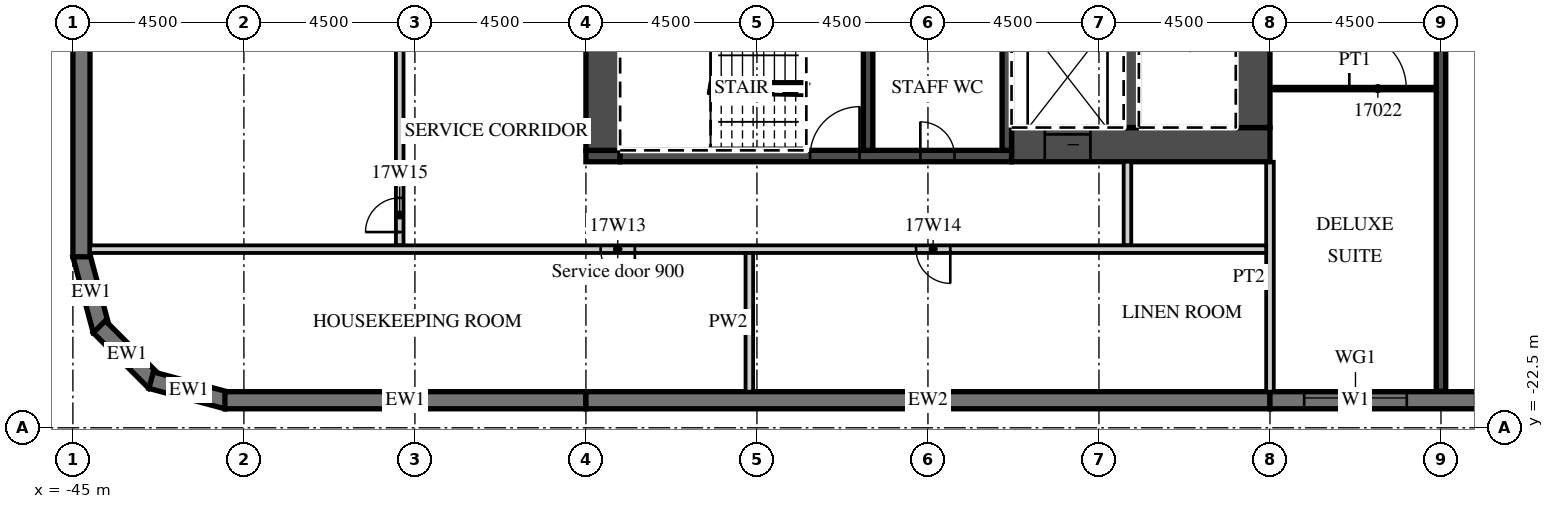
"""IFC4 building model, lengths in metres.
Left out: names, types, materials, properties, quantities, classifications, styles, units other than length and angle.
Written with IfcOpenShell. Run it as: python <this file> out.ifc"""

import sys

from ifc_helpers import new_model, si_unit, direction, frame, frame_2d, origin, place, context, subcontext, project, spatial, polyline, rectangle, outline, extrude, element, fill, save


model = new_model("IFC4")
c1 = context("Model", 3, precision=1e-05, world=origin(), true_north=direction((0.0, 1.0)))
c2 = subcontext(c1, "Body", "Model", "MODEL_VIEW")
j1 = project(units=[si_unit("LENGTHUNIT", "METRE"), si_unit("PLANEANGLEUNIT", "RADIAN")], contexts=[c1])
p1 = place(None, origin())
s1 = spatial("IfcSite", under=j1, at=p1, CompositionType="ELEMENT")
p2 = place(p1, origin())
s2 = spatial("IfcBuilding", under=s1, at=p2, CompositionType="ELEMENT")
p3 = place(p2, frame((0.0, 0.0, 86.4)))
s3 = spatial("IfcBuildingStorey", under=s2, at=p3, CompositionType="ELEMENT", Elevation=86.4)
p4 = place(p3, frame((-9.0, -21.54, 0.0), z_axis=(0.0, 0.0, 1.0), x_axis=(0.0, 1.0, 0.0)))
e1 = element("IfcWall", 1, at=p4, inside=s3, PredefinedType="SHEAR", context=c2, shape_type="SweptSolid", body=[
    extrude(rectangle(XDim=20.14, YDim=0.25, at=frame_2d((10.07, 0.0))), origin(), (0.0, 0.0, 1.0), 3.3),
])
p5 = place(p3, frame((-44.783, -17.942, 0.0), z_axis=(0.0, 0.0, 1.0), x_axis=(0.25881466832, -0.965926999034, 0.0)))
e2 = element("IfcWall", 2, at=p5, inside=s3, PredefinedType="SOLIDWALL", context=c2, shape_type="SweptSolid", body=[
    extrude(outline(polyline([(0.0, -0.225), (2.071, -0.225), (1.95, 0.225), (0.121, 0.225), (0.0, -0.225)])), origin(), (0.0, 0.0, 1.0), 3.02),
])
p6 = place(p3, frame((-44.305, -19.841, 0.0), z_axis=(0.0, 0.0, 1.0), x_axis=(0.707106781187, -0.707106781187, 0.0)))
e3 = element("IfcWall", 3, at=p6, inside=s3, PredefinedType="SOLIDWALL", context=c2, shape_type="SweptSolid", body=[
    extrude(outline(polyline([(0.0, -0.225), (2.071, -0.225), (1.95, 0.225), (0.121, 0.225), (0.0, -0.225)])), origin(), (0.0, 0.0, 1.0), 3.02),
])
p7 = place(p3, frame((-42.942, -21.247, 0.0), z_axis=(0.0, 0.0, 1.0), x_axis=(0.965926999034, -0.25881466832, 0.0)))
e4 = element("IfcWall", 4, at=p7, inside=s3, PredefinedType="SOLIDWALL", context=c2, shape_type="SweptSolid", body=[
    extrude(outline(polyline([(-0.0, -0.225), (2.07, -0.225), (1.95, 0.225), (0.12, 0.225), (-0.0, -0.225)])), origin(), (0.0, 0.0, 1.0), 3.02),
])
p8 = place(p3, frame((-41.0, -21.775, 0.0), z_axis=(0.0, 0.0, 1.0), x_axis=(1.0, 0.0, 0.0)))
e5 = element("IfcWall", 5, at=p8, inside=s3, PredefinedType="SOLIDWALL", context=c2, shape_type="SweptSolid", body=[
    extrude(rectangle(XDim=9.5, YDim=0.45, at=frame_2d((4.75, 0.0))), origin(), (0.0, 0.0, 1.0), 3.02),
])
p9 = place(p3, frame((-31.5, -21.775, 0.0), z_axis=(0.0, 0.0, 1.0), x_axis=(1.0, 0.0, 0.0)))
e6 = element("IfcWall", 6, at=p9, inside=s3, PredefinedType="SOLIDWALL", context=c2, shape_type="SweptSolid", body=[
    extrude(rectangle(XDim=18.0, YDim=0.45, at=frame_2d((9.0, 0.0))), origin(), (0.0, 0.0, 1.0), 3.02),
])
p10 = place(p3, frame((-13.5, -21.775, 0.0), z_axis=(0.0, 0.0, 1.0), x_axis=(1.0, 0.0, 0.0)))
e7 = element("IfcWall", 7, at=p10, inside=s3, PredefinedType="SOLIDWALL", context=c2, shape_type="SweptSolid", body=[
    extrude(rectangle(XDim=54.5, YDim=0.45, at=frame_2d((27.25, 0.0))), origin(), (0.0, 0.0, 1.0), 3.02),
])
p11 = place(p10, frame((0.9, 0.0, 0.45)))
e8 = element("IfcOpeningElement", 8, at=p11, cuts=e7, PredefinedType="OPENING", context=c2, shape_type="SweptSolid", body=[
    extrude(rectangle(XDim=2.7, YDim=2.25, at=frame_2d((1.35, 1.125))), frame((0.0, 0.235, 0.0), z_axis=(0.0, -1.0, 0.0), x_axis=(1.0, 0.0, 0.0)), (0.0, 0.0, 1.0), 0.47),
])
p12 = place(p10, frame((5.4, 0.0, 0.45)))
e9 = element("IfcOpeningElement", 9, at=p12, cuts=e7, PredefinedType="OPENING", context=c2, shape_type="SweptSolid", body=[
    extrude(rectangle(XDim=2.7, YDim=2.25, at=frame_2d((1.35, 1.125))), frame((0.0, 0.235, 0.0), z_axis=(0.0, -1.0, 0.0), x_axis=(1.0, 0.0, 0.0)), (0.0, 0.0, 1.0), 0.47),
])
p13 = place(p10, frame((9.9, 0.0, 0.45)))
e10 = element("IfcOpeningElement", 10, at=p13, cuts=e7, PredefinedType="OPENING", context=c2, shape_type="SweptSolid", body=[
    extrude(rectangle(XDim=2.7, YDim=2.25, at=frame_2d((1.35, 1.125))), frame((0.0, 0.235, 0.0), z_axis=(0.0, -1.0, 0.0), x_axis=(1.0, 0.0, 0.0)), (0.0, 0.0, 1.0), 0.47),
])
p14 = place(p10, frame((14.4, 0.0, 0.45)))
e11 = element("IfcOpeningElement", 11, at=p14, cuts=e7, PredefinedType="OPENING", context=c2, shape_type="SweptSolid", body=[
    extrude(rectangle(XDim=2.7, YDim=2.25, at=frame_2d((1.35, 1.125))), frame((0.0, 0.235, 0.0), z_axis=(0.0, -1.0, 0.0), x_axis=(1.0, 0.0, 0.0)), (0.0, 0.0, 1.0), 0.47),
])
p15 = place(p10, frame((18.9, 0.0, 0.45)))
e12 = element("IfcOpeningElement", 12, at=p15, cuts=e7, PredefinedType="OPENING", context=c2, shape_type="SweptSolid", body=[
    extrude(rectangle(XDim=2.7, YDim=2.25, at=frame_2d((1.35, 1.125))), frame((0.0, 0.235, 0.0), z_axis=(0.0, -1.0, 0.0), x_axis=(1.0, 0.0, 0.0)), (0.0, 0.0, 1.0), 0.47),
])
p16 = place(p10, frame((23.4, 0.0, 0.45)))
e13 = element("IfcOpeningElement", 13, at=p16, cuts=e7, PredefinedType="OPENING", context=c2, shape_type="SweptSolid", body=[
    extrude(rectangle(XDim=2.7, YDim=2.25, at=frame_2d((1.35, 1.125))), frame((0.0, 0.235, 0.0), z_axis=(0.0, -1.0, 0.0), x_axis=(1.0, 0.0, 0.0)), (0.0, 0.0, 1.0), 0.47),
])
p17 = place(p10, frame((27.9, 0.0, 0.45)))
e14 = element("IfcOpeningElement", 14, at=p17, cuts=e7, PredefinedType="OPENING", context=c2, shape_type="SweptSolid", body=[
    extrude(rectangle(XDim=2.7, YDim=2.25, at=frame_2d((1.35, 1.125))), frame((0.0, 0.235, 0.0), z_axis=(0.0, -1.0, 0.0), x_axis=(1.0, 0.0, 0.0)), (0.0, 0.0, 1.0), 0.47),
])
p18 = place(p10, frame((32.4, 0.0, 0.45)))
e15 = element("IfcOpeningElement", 15, at=p18, cuts=e7, PredefinedType="OPENING", context=c2, shape_type="SweptSolid", body=[
    extrude(rectangle(XDim=2.7, YDim=2.25, at=frame_2d((1.35, 1.125))), frame((0.0, 0.235, 0.0), z_axis=(0.0, -1.0, 0.0), x_axis=(1.0, 0.0, 0.0)), (0.0, 0.0, 1.0), 0.47),
])
p19 = place(p10, frame((36.9, 0.0, 0.45)))
e16 = element("IfcOpeningElement", 16, at=p19, cuts=e7, PredefinedType="OPENING", context=c2, shape_type="SweptSolid", body=[
    extrude(rectangle(XDim=2.7, YDim=2.25, at=frame_2d((1.35, 1.125))), frame((0.0, 0.235, 0.0), z_axis=(0.0, -1.0, 0.0), x_axis=(1.0, 0.0, 0.0)), (0.0, 0.0, 1.0), 0.47),
])
p20 = place(p10, frame((41.4, 0.0, 0.45)))
e17 = element("IfcOpeningElement", 17, at=p20, cuts=e7, PredefinedType="OPENING", context=c2, shape_type="SweptSolid", body=[
    extrude(rectangle(XDim=2.7, YDim=2.25, at=frame_2d((1.35, 1.125))), frame((0.0, 0.235, 0.0), z_axis=(0.0, -1.0, 0.0), x_axis=(1.0, 0.0, 0.0)), (0.0, 0.0, 1.0), 0.47),
])
p21 = place(p10, frame((45.9, 0.0, 0.45)))
e18 = element("IfcOpeningElement", 18, at=p21, cuts=e7, PredefinedType="OPENING", context=c2, shape_type="SweptSolid", body=[
    extrude(rectangle(XDim=2.7, YDim=2.25, at=frame_2d((1.35, 1.125))), frame((0.0, 0.235, 0.0), z_axis=(0.0, -1.0, 0.0), x_axis=(1.0, 0.0, 0.0)), (0.0, 0.0, 1.0), 0.47),
])
p22 = place(p10, frame((50.4, 0.0, 0.45)))
e19 = element("IfcOpeningElement", 19, at=p22, cuts=e7, PredefinedType="OPENING", context=c2, shape_type="SweptSolid", body=[
    extrude(rectangle(XDim=2.7, YDim=2.25, at=frame_2d((1.35, 1.125))), frame((0.0, 0.235, 0.0), z_axis=(0.0, -1.0, 0.0), x_axis=(1.0, 0.0, 0.0)), (0.0, 0.0, 1.0), 0.47),
])
p23 = place(p3, frame((-44.775, 18.0, 0.0), z_axis=(0.0, 0.0, 1.0), x_axis=(0.0, -1.0, 0.0)))
e20 = element("IfcWall", 20, at=p23, inside=s3, PredefinedType="SOLIDWALL", context=c2, shape_type="SweptSolid", body=[
    extrude(rectangle(XDim=36.0, YDim=0.45, at=frame_2d((18.0, 0.0))), origin(), (0.0, 0.0, 1.0), 3.02),
])
p24 = place(p23, frame((3.9, 0.0, 0.45)))
e21 = element("IfcOpeningElement", 21, at=p24, cuts=e20, PredefinedType="OPENING", context=c2, shape_type="SweptSolid", body=[
    extrude(rectangle(XDim=3.3, YDim=2.25, at=frame_2d((1.65, 1.125))), frame((0.0, 0.235, 0.0), z_axis=(0.0, -1.0, 0.0), x_axis=(1.0, 0.0, 0.0)), (0.0, 0.0, 1.0), 0.47),
])
p25 = place(p23, frame((8.4, 0.0, 0.45)))
e22 = element("IfcOpeningElement", 22, at=p25, cuts=e20, PredefinedType="OPENING", context=c2, shape_type="SweptSolid", body=[
    extrude(rectangle(XDim=3.3, YDim=2.25, at=frame_2d((1.65, 1.125))), frame((0.0, 0.235, 0.0), z_axis=(0.0, -1.0, 0.0), x_axis=(1.0, 0.0, 0.0)), (0.0, 0.0, 1.0), 0.47),
])
p26 = place(p23, frame((12.9, 0.0, 0.45)))
e23 = element("IfcOpeningElement", 23, at=p26, cuts=e20, PredefinedType="OPENING", context=c2, shape_type="SweptSolid", body=[
    extrude(rectangle(XDim=3.3, YDim=2.25, at=frame_2d((1.65, 1.125))), frame((0.0, 0.235, 0.0), z_axis=(0.0, -1.0, 0.0), x_axis=(1.0, 0.0, 0.0)), (0.0, 0.0, 1.0), 0.47),
])
p27 = place(p3, frame((-13.5, -21.55, 0.0), z_axis=(0.0, 0.0, 1.0), x_axis=(0.0, 1.0, 0.0)))
e24 = element("IfcWall", 24, at=p27, inside=s3, PredefinedType="PARTITIONING", context=c2, shape_type="SweptSolid", body=[
    extrude(rectangle(XDim=6.05, YDim=0.2, at=frame_2d((3.025, 0.0))), origin(), (0.0, 0.0, 1.0), 3.02),
])
p28 = place(p3, frame((-13.4, -13.575, 0.0), z_axis=(0.0, 0.0, 1.0), x_axis=(1.0, 0.0, 0.0)))
e25 = element("IfcWall", 25, at=p28, inside=s3, PredefinedType="PARTITIONING", context=c2, shape_type="SweptSolid", body=[
    extrude(rectangle(XDim=4.275, YDim=0.1, at=frame_2d((2.137, 0.0))), origin(), (0.0, 0.0, 1.0), 3.02),
])
p29 = place(p28, frame((1.988, 0.0, 0.0)))
e26 = element("IfcOpeningElement", 26, at=p29, cuts=e25, PredefinedType="OPENING", context=c2, shape_type="SweptSolid", body=[
    extrude(rectangle(XDim=1.5, YDim=2.1, at=frame_2d((0.75, 1.05))), frame((0.0, 0.06, 0.0), z_axis=(0.0, -1.0, 0.0), x_axis=(1.0, 0.0, 0.0)), (0.0, 0.0, 1.0), 0.12),
])
p30 = place(p3, frame((-20.3, -15.05, 0.0), z_axis=(0.0, 0.0, 1.0), x_axis=(1.0, 0.0, 0.0)))
e27 = element("IfcWall", 27, at=p30, inside=s3, PredefinedType="SHEAR", context=c2, shape_type="SweptSolid", body=[
    extrude(rectangle(XDim=6.8, YDim=0.9, at=frame_2d((3.4, 0.0))), origin(), (0.0, 0.0, 1.0), 3.02),
])
p31 = place(p30, frame((0.875, 0.0, 0.0)))
e28 = element("IfcOpeningElement", 28, at=p31, cuts=e27, PredefinedType="OPENING", context=c2, shape_type="SweptSolid", body=[
    extrude(rectangle(XDim=1.2, YDim=2.1, at=frame_2d((0.6, 1.05))), frame((0.0, 0.46, 0.0), z_axis=(0.0, -1.0, 0.0), x_axis=(1.0, 0.0, 0.0)), (0.0, 0.0, 1.0), 0.92),
])
p32 = place(p3, frame((-31.5, -15.35, 0.0), z_axis=(0.0, 0.0, 1.0), x_axis=(1.0, 0.0, 0.0)))
e29 = element("IfcWall", 29, at=p32, inside=s3, PredefinedType="SHEAR", context=c2, shape_type="SweptSolid", body=[
    extrude(rectangle(XDim=0.9, YDim=0.3, at=frame_2d((0.45, 0.0))), origin(), (0.0, 0.0, 1.0), 3.02),
])
p33 = place(p3, frame((-30.6, -15.35, 0.0), z_axis=(0.0, 0.0, 1.0), x_axis=(1.0, 0.0, 0.0)))
e30 = element("IfcWall", 30, at=p33, inside=s3, PredefinedType="SHEAR", context=c2, shape_type="SweptSolid", body=[
    extrude(rectangle(XDim=10.3, YDim=0.3, at=frame_2d((5.15, 0.0))), origin(), (0.0, 0.0, 1.0), 3.02),
])
p34 = place(p33, frame((5.0, 0.0, 0.0)))
e31 = element("IfcOpeningElement", 31, at=p34, cuts=e30, PredefinedType="OPENING", context=c2, shape_type="SweptSolid", body=[
    extrude(rectangle(XDim=1.3, YDim=2.1, at=frame_2d((0.65, 1.05))), frame((0.0, 0.16, 0.0), z_axis=(0.0, -1.0, 0.0), x_axis=(1.0, 0.0, 0.0)), (0.0, 0.0, 1.0), 0.32),
])
p35 = place(p33, frame((7.9, 0.0, 0.0)))
e32 = element("IfcOpeningElement", 32, at=p35, cuts=e30, PredefinedType="OPENING", context=c2, shape_type="SweptSolid", body=[
    extrude(rectangle(XDim=0.9, YDim=2.1, at=frame_2d((0.45, 1.05))), frame((0.0, 0.16, 0.0), z_axis=(0.0, -1.0, 0.0), x_axis=(1.0, 0.0, 0.0)), (0.0, 0.0, 1.0), 0.32),
])
p36 = place(p3, frame((-31.05, -15.2, 0.0), z_axis=(0.0, 0.0, 1.0), x_axis=(0.0, 1.0, 0.0)))
e33 = element("IfcWall", 33, at=p36, inside=s3, PredefinedType="SHEAR", context=c2, shape_type="SweptSolid", body=[
    extrude(rectangle(XDim=12.8, YDim=0.9, at=frame_2d((6.4, 0.0))), origin(), (0.0, 0.0, 1.0), 3.02),
])
p37 = place(p36, frame((11.5, 0.0, 0.0)))
e34 = element("IfcOpeningElement", 34, at=p37, cuts=e33, PredefinedType="OPENING", context=c2, shape_type="SweptSolid", body=[
    extrude(rectangle(XDim=1.1, YDim=2.1, at=frame_2d((0.55, 1.05))), frame((0.0, 0.46, 0.0), z_axis=(0.0, -1.0, 0.0), x_axis=(1.0, 0.0, 0.0)), (0.0, 0.0, 1.0), 0.92),
])
p38 = place(p3, frame((-13.95, -14.6, 0.0), z_axis=(0.0, 0.0, 1.0), x_axis=(0.0, 1.0, 0.0)))
e35 = element("IfcWall", 35, at=p38, inside=s3, PredefinedType="SHEAR", context=c2, shape_type="SweptSolid", body=[
    extrude(rectangle(XDim=12.2, YDim=0.9, at=frame_2d((6.1, 0.0))), origin(), (0.0, 0.0, 1.0), 3.02),
])
p39 = place(p3, frame((-17.15, -14.6, 0.0), z_axis=(0.0, 0.0, 1.0), x_axis=(0.0, 1.0, 0.0)))
e36 = element("IfcWall", 36, at=p39, inside=s3, PredefinedType="SHEAR", context=c2, shape_type="SweptSolid", body=[
    extrude(rectangle(XDim=5.8, YDim=0.4, at=frame_2d((2.9, 0.0))), origin(), (0.0, 0.0, 1.0), 3.02),
])
for number, where, z_axis, x_axis in (
    (37, (-20.425, -15.2, 0.0), (0.0, 0.0, 1.0), (0.0, 1.0, 0.0)),
    (38, (-24.075, -15.2, 0.0), (0.0, 0.0, 1.0), (0.0, 1.0, 0.0)),
):
    element("IfcWall", number, at=place(p3, frame(where, z_axis=z_axis, x_axis=x_axis)), inside=s3, PredefinedType="SHEAR", context=c2, shape_type="SweptSolid", body=[
        extrude(rectangle(XDim=3.25, YDim=0.25, at=frame_2d((1.625, 0.0))), origin(), (0.0, 0.0, 1.0), 3.02),
    ])
p40 = place(p3, frame((-17.25, -17.7, 0.0), z_axis=(0.0, 0.0, 1.0), x_axis=(0.0, 1.0, 0.0)))
e39 = element("IfcWall", 39, at=p40, inside=s3, PredefinedType="PARTITIONING", context=c2, shape_type="SweptSolid", body=[
    extrude(rectangle(XDim=2.2, YDim=0.2, at=frame_2d((1.1, 0.0))), origin(), (0.0, 0.0, 1.0), 3.02),
])
p41 = place(p3, frame((-36.4, -17.7, 0.0), z_axis=(0.0, 0.0, 1.0), x_axis=(0.0, 1.0, 0.0)))
e40 = element("IfcWall", 40, at=p41, inside=s3, PredefinedType="PARTITIONING", context=c2, shape_type="SweptSolid", body=[
    extrude(rectangle(XDim=15.95, YDim=0.2, at=frame_2d((7.975, 0.0))), origin(), (0.0, 0.0, 1.0), 3.02),
])
p42 = place(p41, frame((0.35, 0.0, 0.0)))
e41 = element("IfcOpeningElement", 41, at=p42, cuts=e40, PredefinedType="OPENING", context=c2, shape_type="SweptSolid", body=[
    extrude(rectangle(XDim=0.9, YDim=2.1, at=frame_2d((0.45, 1.05))), frame((0.0, 0.11, 0.0), z_axis=(0.0, -1.0, 0.0), x_axis=(1.0, 0.0, 0.0)), (0.0, 0.0, 1.0), 0.22),
])
p43 = place(p3, frame((-44.55, -17.8, 0.0), z_axis=(0.0, 0.0, 1.0), x_axis=(1.0, 0.0, 0.0)))
e42 = element("IfcWall", 42, at=p43, inside=s3, PredefinedType="PARTITIONING", context=c2, shape_type="SweptSolid", body=[
    extrude(rectangle(XDim=30.95, YDim=0.2, at=frame_2d((15.475, 0.0))), origin(), (0.0, 0.0, 1.0), 3.02),
])
p44 = place(p43, frame((13.438, 0.0, 0.0)))
e43 = element("IfcOpeningElement", 43, at=p44, cuts=e42, PredefinedType="OPENING", context=c2, shape_type="SweptSolid", body=[
    extrude(rectangle(XDim=0.9, YDim=2.1, at=frame_2d((0.45, 1.05))), frame((0.0, 0.11, 0.0), z_axis=(0.0, -1.0, 0.0), x_axis=(1.0, 0.0, 0.0)), (0.0, 0.0, 1.0), 0.22),
])
p45 = place(p43, frame((21.738, 0.0, 0.0)))
e44 = element("IfcOpeningElement", 44, at=p45, cuts=e42, PredefinedType="OPENING", context=c2, shape_type="SweptSolid", body=[
    extrude(rectangle(XDim=0.9, YDim=2.1, at=frame_2d((0.45, 1.05))), frame((0.0, 0.11, 0.0), z_axis=(0.0, -1.0, 0.0), x_axis=(1.0, 0.0, 0.0)), (0.0, 0.0, 1.0), 0.22),
])
p46 = place(p3, frame((-27.2, -21.55, 0.0), z_axis=(0.0, 0.0, 1.0), x_axis=(0.0, 1.0, 0.0)))
e45 = element("IfcWall", 45, at=p46, inside=s3, PredefinedType="PARTITIONING", context=c2, shape_type="SweptSolid", body=[
    extrude(rectangle(XDim=3.65, YDim=0.2, at=frame_2d((1.825, 0.0))), origin(), (0.0, 0.0, 1.0), 3.02),
])
p47 = place(p11, origin())
e46 = element("IfcWindow", 46, at=p47, inside=s3, PartitioningType="SINGLE_PANEL", PredefinedType="WINDOW", context=c2, shape_type="SweptSolid", body=[
    extrude(rectangle(XDim=2.7, YDim=2.25, at=frame_2d((1.35, 1.125))), frame((0.0, 0.09, 0.0), z_axis=(0.0, -1.0, 0.0), x_axis=(1.0, 0.0, 0.0)), (0.0, 0.0, 1.0), 0.06),
])
fill(e8, e46)
p48 = place(p29, origin())
e47 = element("IfcDoor", 47, at=p48, inside=s3, OperationType="SINGLE_SWING_LEFT", PredefinedType="DOOR", context=c2, shape_type="SweptSolid", body=[
    extrude(rectangle(XDim=1.5, YDim=2.1, at=frame_2d((0.75, 1.05))), frame((0.0, 0.025, 0.0), z_axis=(0.0, -1.0, 0.0), x_axis=(1.0, 0.0, 0.0)), (0.0, 0.0, 1.0), 0.05),
])
fill(e26, e47)
p49 = place(p31, origin())
e48 = element("IfcDoor", 48, at=p49, inside=s3, OperationType="SLIDING_TO_LEFT", PredefinedType="DOOR", context=c2, shape_type="SweptSolid", body=[
    extrude(rectangle(XDim=1.2, YDim=2.1, at=frame_2d((0.6, 1.05))), frame((0.0, 0.025, 0.0), z_axis=(0.0, -1.0, 0.0), x_axis=(1.0, 0.0, 0.0)), (0.0, 0.0, 1.0), 0.05),
])
fill(e28, e48)
p50 = place(p34, origin())
e49 = element("IfcDoor", 49, at=p50, inside=s3, OperationType="SINGLE_SWING_RIGHT", PredefinedType="DOOR", context=c2, shape_type="SweptSolid", body=[
    extrude(rectangle(XDim=1.3, YDim=2.1, at=frame_2d((0.65, 1.05))), frame((0.0, 0.025, 0.0), z_axis=(0.0, -1.0, 0.0), x_axis=(1.0, 0.0, 0.0)), (0.0, 0.0, 1.0), 0.05),
])
fill(e31, e49)
p51 = place(p35, origin())
e50 = element("IfcDoor", 50, at=p51, inside=s3, OperationType="SINGLE_SWING_LEFT", PredefinedType="DOOR", context=c2, shape_type="SweptSolid", body=[
    extrude(rectangle(XDim=0.9, YDim=2.1, at=frame_2d((0.45, 1.05))), frame((0.0, 0.025, 0.0), z_axis=(0.0, -1.0, 0.0), x_axis=(1.0, 0.0, 0.0)), (0.0, 0.0, 1.0), 0.05),
])
fill(e32, e50)
p52 = place(p44, origin())
e51 = element("IfcDoor", 51, at=p52, inside=s3, OperationType="SINGLE_SWING_RIGHT", PredefinedType="DOOR", context=c2, shape_type="SweptSolid", body=[
    extrude(rectangle(XDim=0.9, YDim=2.1, at=frame_2d((0.45, 1.05))), frame((0.0, 0.025, 0.0), z_axis=(0.0, -1.0, 0.0), x_axis=(1.0, 0.0, 0.0)), (0.0, 0.0, 1.0), 0.05),
])
fill(e43, e51)
p53 = place(p45, origin())
e52 = element("IfcDoor", 52, at=p53, inside=s3, OperationType="SINGLE_SWING_RIGHT", PredefinedType="DOOR", context=c2, shape_type="SweptSolid", body=[
    extrude(rectangle(XDim=0.9, YDim=2.1, at=frame_2d((0.45, 1.05))), frame((0.0, 0.025, 0.0), z_axis=(0.0, -1.0, 0.0), x_axis=(1.0, 0.0, 0.0)), (0.0, 0.0, 1.0), 0.05),
])
fill(e44, e52)
p54 = place(p42, origin())
e53 = element("IfcDoor", 53, at=p54, inside=s3, OperationType="SINGLE_SWING_LEFT", PredefinedType="DOOR", context=c2, shape_type="SweptSolid", body=[
    extrude(rectangle(XDim=0.9, YDim=2.1, at=frame_2d((0.45, 1.05))), frame((0.0, 0.025, 0.0), z_axis=(0.0, -1.0, 0.0), x_axis=(1.0, 0.0, 0.0)), (0.0, 0.0, 1.0), 0.05),
])
fill(e41, e53)
save(model, sys.argv[1])
